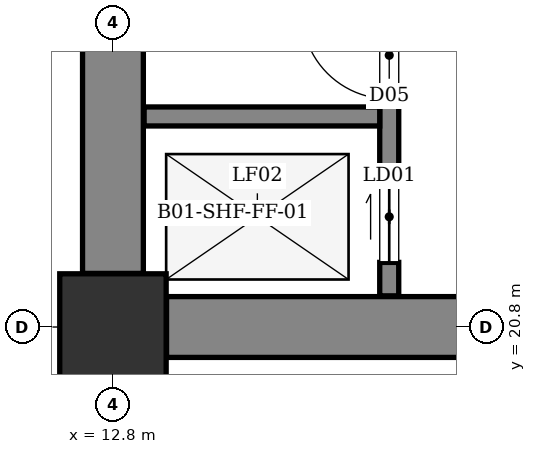
"""IFC4 building model, lengths in metres.
Left out: names, types, materials, properties, quantities, classifications, styles, units other than length and angle.
Written with IfcOpenShell. Run it as: python <this file> out.ifc"""

import sys

from ifc_helpers import new_model, si_unit, direction, frame, frame_2d, origin, origin_2d, place, context, subcontext, project, spatial, rectangle, extrude, element, fill, save


model = new_model("IFC4")
c1 = context("Model", 3, precision=1e-05, world=origin(), true_north=direction((0.0, 1.0)))
c2 = subcontext(c1, "Body", "Model", "MODEL_VIEW")
j1 = project(units=[si_unit("LENGTHUNIT", "METRE"), si_unit("PLANEANGLEUNIT", "RADIAN")], contexts=[c1])
p1 = place(None, origin())
s1 = spatial("IfcSite", under=j1, at=p1, CompositionType="ELEMENT")
p2 = place(p1, origin())
s2 = spatial("IfcBuilding", under=s1, at=p2, CompositionType="ELEMENT")
p3 = place(p2, frame((0.0, 0.0, -4.8)))
s3 = spatial("IfcBuildingStorey", under=s2, at=p3, CompositionType="ELEMENT", Elevation=-4.8)
p4 = place(p3, frame((12.8, 20.8, 0.0), z_axis=(0.0, 0.0, 1.0), x_axis=(1.0, 0.0, 0.0)))
e1 = element("IfcColumn", 1, at=p4, inside=s3, PredefinedType="COLUMN", context=c2, shape_type="SweptSolid", body=[
    extrude(rectangle(XDim=1.4, YDim=1.4, at=origin_2d()), origin(), (0.0, 0.0, 1.0), 4.8),
])
p5 = place(p3, frame((12.8, 21.505, 0.0), z_axis=(0.0, 0.0, 1.0), x_axis=(0.0, 1.0, 0.0)))
e2 = element("IfcWall", 2, at=p5, inside=s3, PredefinedType="SHEAR", context=c2, shape_type="SweptSolid", body=[
    extrude(rectangle(XDim=11.39, YDim=0.8, at=frame_2d((5.695, 0.0))), origin(), (0.0, 0.0, 1.0), 4.35),
])
p6 = place(p3, frame((13.505, 20.8, 0.0), z_axis=(0.0, 0.0, 1.0), x_axis=(1.0, 0.0, 0.0)))
e3 = element("IfcWall", 3, at=p6, inside=s3, PredefinedType="SHEAR", context=c2, shape_type="SweptSolid", body=[
    extrude(rectangle(XDim=6.59, YDim=0.8, at=frame_2d((3.295, 0.0))), origin(), (0.0, 0.0, 1.0), 4.35),
])
p7 = place(p3, frame((16.435, 21.21, 0.0), z_axis=(0.0, 0.0, 1.0), x_axis=(0.0, 1.0, 0.0)))
e4 = element("IfcWall", 4, at=p7, inside=s3, PredefinedType="SHEAR", context=c2, shape_type="SweptSolid", body=[
    extrude(rectangle(XDim=11.98, YDim=0.25, at=frame_2d((5.99, 0.0))), origin(), (0.0, 0.0, 1.0), 4.35),
])
p8 = place(p7, frame((0.44, 0.0, 0.0)))
e5 = element("IfcOpeningElement", 5, at=p8, cuts=e4, PredefinedType="OPENING", context=c2, shape_type="SweptSolid", body=[
    extrude(rectangle(XDim=1.2, YDim=2.15, at=frame_2d((0.6, 1.075))), frame((0.0, 0.135, 0.0), z_axis=(0.0, -1.0, 0.0), x_axis=(1.0, 0.0, 0.0)), (0.0, 0.0, 1.0), 0.27),
])
p9 = place(p7, frame((2.59, 0.0, 0.0)))
e6 = element("IfcOpeningElement", 6, at=p9, cuts=e4, PredefinedType="OPENING", context=c2, shape_type="SweptSolid", body=[
    extrude(rectangle(XDim=1.15, YDim=2.15, at=frame_2d((0.575, 1.075))), frame((0.0, 0.135, 0.0), z_axis=(0.0, -1.0, 0.0), x_axis=(1.0, 0.0, 0.0)), (0.0, 0.0, 1.0), 0.27),
])
p10 = place(p3, frame((13.21, 23.57, 0.0), z_axis=(0.0, 0.0, 1.0), x_axis=(1.0, 0.0, 0.0)))
e7 = element("IfcWall", 7, at=p10, inside=s3, PredefinedType="SHEAR", context=c2, shape_type="SweptSolid", body=[
    extrude(rectangle(XDim=3.1, YDim=0.25, at=frame_2d((1.55, 0.0))), origin(), (0.0, 0.0, 1.0), 4.35),
])
p11 = place(p8, origin())
e8 = element("IfcDoor", 8, at=p11, inside=s3, OperationType="DOUBLE_DOOR_SLIDING", PredefinedType="DOOR", context=c2, shape_type="SweptSolid", body=[
    extrude(rectangle(XDim=1.2, YDim=2.15, at=frame_2d((0.6, 1.075))), frame((0.0, 0.025, 0.0), z_axis=(0.0, -1.0, 0.0), x_axis=(1.0, 0.0, 0.0)), (0.0, 0.0, 1.0), 0.05),
])
fill(e5, e8)
p12 = place(p9, origin())
e9 = element("IfcDoor", 9, at=p12, inside=s3, OperationType="SINGLE_SWING_RIGHT", PredefinedType="DOOR", context=c2, shape_type="SweptSolid", body=[
    extrude(rectangle(XDim=1.15, YDim=2.15, at=frame_2d((0.575, 1.075))), frame((0.0, 0.025, 0.0), z_axis=(0.0, -1.0, 0.0), x_axis=(1.0, 0.0, 0.0)), (0.0, 0.0, 1.0), 0.05),
])
fill(e6, e9)
save(model, sys.argv[1])
